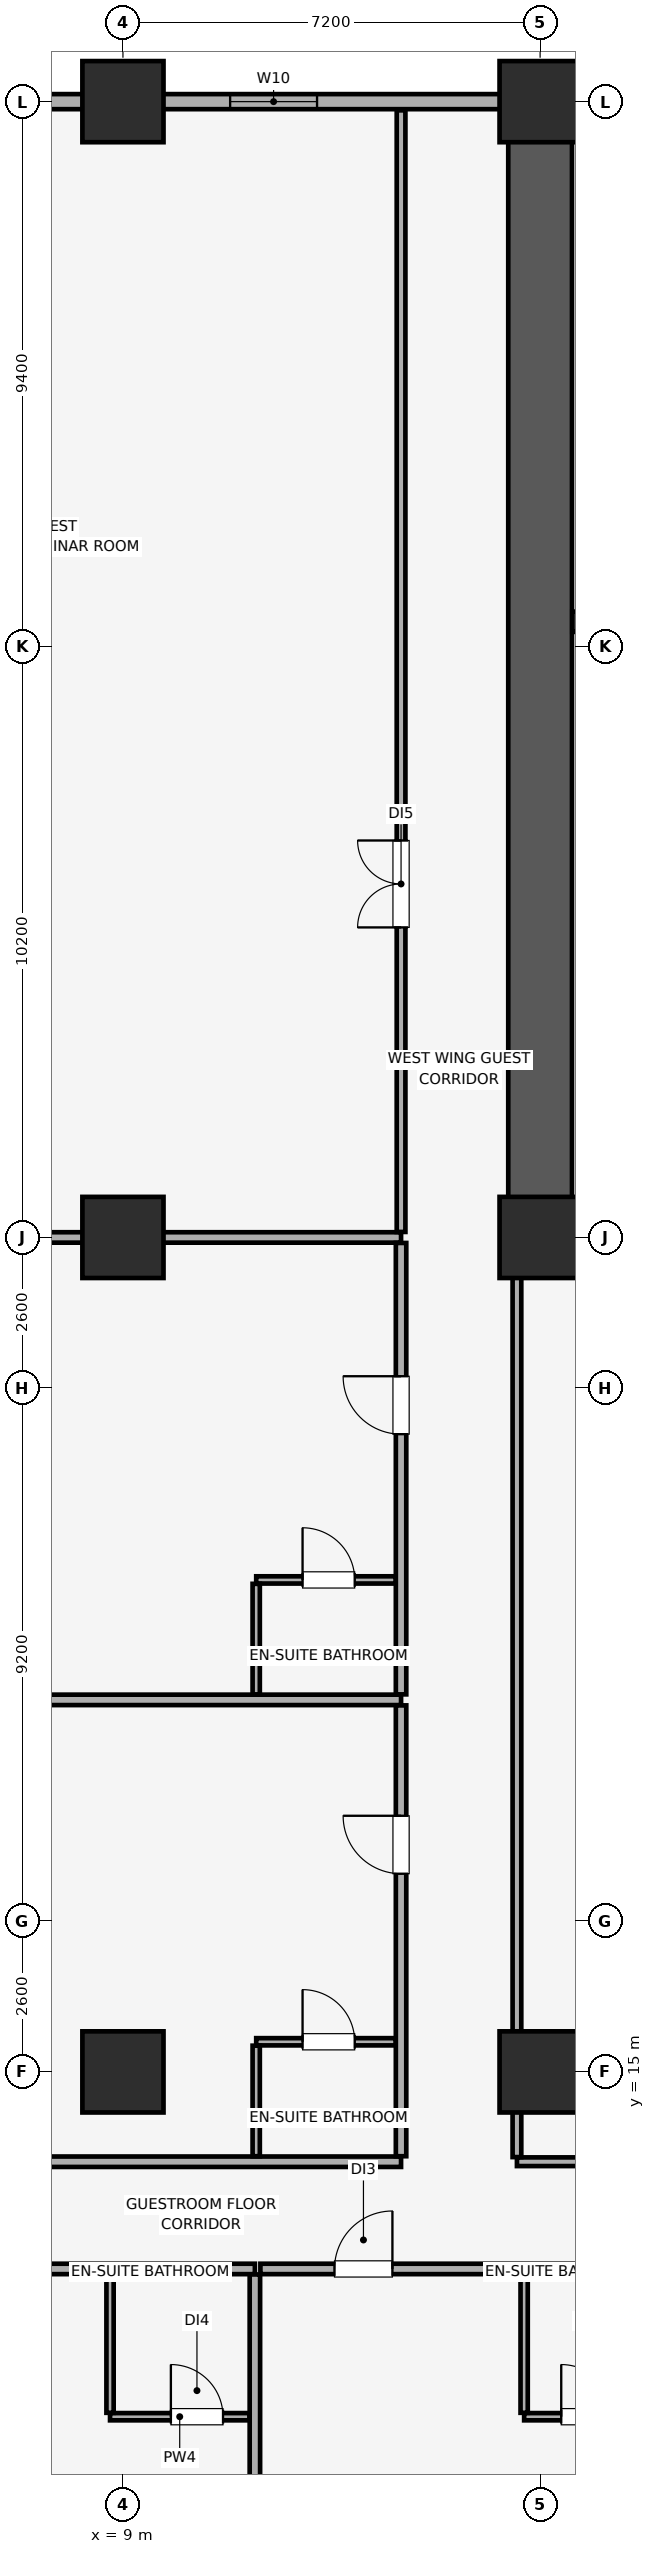
"""IFC4 building model, lengths in metres.
Left out: names, types, materials, properties, quantities, classifications, styles, units other than length and angle.
Written with IfcOpenShell. Run it as: python <this file> out.ifc"""

import sys

from ifc_helpers import new_model, si_unit, direction, frame, frame_2d, origin, origin_2d, place, context, subcontext, project, spatial, rectangle, extrude, element, fill, save


model = new_model("IFC4")
c1 = context("Model", 3, precision=1e-05, world=origin(), true_north=direction((0.0, 1.0)))
c2 = subcontext(c1, "Body", "Model", "MODEL_VIEW")
j1 = project(units=[si_unit("LENGTHUNIT", "METRE"), si_unit("PLANEANGLEUNIT", "RADIAN")], contexts=[c1])
p1 = place(None, origin())
s1 = spatial("IfcSite", under=j1, at=p1, CompositionType="ELEMENT")
p2 = place(p1, origin())
s2 = spatial("IfcBuilding", under=s1, at=p2, CompositionType="ELEMENT")
p3 = place(p2, frame((0.0, 0.0, 57.65)))
s3 = spatial("IfcBuildingStorey", under=s2, at=p3, CompositionType="ELEMENT", Elevation=57.65)
for number, where, z_axis, x_axis in (
    (1, (9.0, 15.0, 0.0), (0.0, 0.0, 1.0), (1.0, 0.0, 0.0)),
    (2, (16.2, 15.0, 0.0), (0.0, 0.0, 1.0), (1.0, 0.0, 0.0)),
    (3, (9.0, 29.4, 0.0), (0.0, 0.0, 1.0), (1.0, 0.0, 0.0)),
    (4, (9.0, 49.0, 0.0), (0.0, 0.0, 1.0), (1.0, 0.0, 0.0)),
    (5, (16.2, 29.4, 0.0), (0.0, 0.0, 1.0), (1.0, 0.0, 0.0)),
    (6, (16.2, 49.0, 0.0), (0.0, 0.0, 1.0), (1.0, 0.0, 0.0)),
):
    element("IfcColumn", number, at=place(p3, frame(where, z_axis=z_axis, x_axis=x_axis)), inside=s3, PredefinedType="COLUMN", context=c2, shape_type="SweptSolid", body=[
        extrude(rectangle(XDim=1.4, YDim=1.4, at=origin_2d()), origin(), (0.0, 0.0, 1.0), 3.51),
    ])
p4 = place(p3, frame((79.8, 49.0, 0.0), z_axis=(0.0, 0.0, 1.0), x_axis=(-1.0, 0.0, 0.0)))
e7 = element("IfcWall", 7, at=p4, inside=s3, PredefinedType="SOLIDWALL", context=c2, shape_type="SweptSolid", body=[
    extrude(rectangle(XDim=75.6, YDim=0.26, at=frame_2d((37.8, 0.0))), origin(), (0.0, 0.0, 1.0), 2.56),
])
p5 = place(p4, frame((72.565, 0.0, 0.85)))
e8 = element("IfcOpeningElement", 8, at=p5, cuts=e7, PredefinedType="OPENING", context=c2, shape_type="SweptSolid", body=[
    extrude(rectangle(XDim=1.5, YDim=1.4, at=frame_2d((0.75, 0.7))), frame((0.0, 0.14, 0.0), z_axis=(0.0, -1.0, 0.0), x_axis=(1.0, 0.0, 0.0)), (0.0, 0.0, 1.0), 0.28),
])
p6 = place(p4, frame((67.45, 0.0, 0.85)))
e9 = element("IfcOpeningElement", 9, at=p6, cuts=e7, PredefinedType="OPENING", context=c2, shape_type="SweptSolid", body=[
    extrude(rectangle(XDim=1.5, YDim=1.4, at=frame_2d((0.75, 0.7))), frame((0.0, 0.14, 0.0), z_axis=(0.0, -1.0, 0.0), x_axis=(1.0, 0.0, 0.0)), (0.0, 0.0, 1.0), 0.28),
])
p7 = place(p4, frame((7.6, 0.0, 0.85)))
e10 = element("IfcOpeningElement", 10, at=p7, cuts=e7, PredefinedType="OPENING", context=c2, shape_type="SweptSolid", body=[
    extrude(rectangle(XDim=1.5, YDim=1.4, at=frame_2d((0.75, 0.7))), frame((0.0, 0.14, 0.0), z_axis=(0.0, -1.0, 0.0), x_axis=(1.0, 0.0, 0.0)), (0.0, 0.0, 1.0), 0.28),
])
p8 = place(p4, frame((1.535, 0.0, 0.85)))
e11 = element("IfcOpeningElement", 11, at=p8, cuts=e7, PredefinedType="OPENING", context=c2, shape_type="SweptSolid", body=[
    extrude(rectangle(XDim=1.5, YDim=1.4, at=frame_2d((0.75, 0.7))), frame((0.0, 0.14, 0.0), z_axis=(0.0, -1.0, 0.0), x_axis=(1.0, 0.0, 0.0)), (0.0, 0.0, 1.0), 0.28),
])
p9 = place(p4, frame((52.265, 0.0, 0.9)))
e12 = element("IfcOpeningElement", 12, at=p9, cuts=e7, PredefinedType="OPENING", context=c2, shape_type="SweptSolid", body=[
    extrude(rectangle(XDim=1.5, YDim=1.4, at=frame_2d((0.75, 0.7))), frame((0.0, 0.14, 0.0), z_axis=(0.0, -1.0, 0.0), x_axis=(1.0, 0.0, 0.0)), (0.0, 0.0, 1.0), 0.28),
])
p10 = place(p4, frame((45.5, 0.0, 0.9)))
e13 = element("IfcOpeningElement", 13, at=p10, cuts=e7, PredefinedType="OPENING", context=c2, shape_type="SweptSolid", body=[
    extrude(rectangle(XDim=1.5, YDim=1.4, at=frame_2d((0.75, 0.7))), frame((0.0, 0.14, 0.0), z_axis=(0.0, -1.0, 0.0), x_axis=(1.0, 0.0, 0.0)), (0.0, 0.0, 1.0), 0.28),
])
p11 = place(p4, frame((31.05, 0.0, 0.9)))
e14 = element("IfcOpeningElement", 14, at=p11, cuts=e7, PredefinedType="OPENING", context=c2, shape_type="SweptSolid", body=[
    extrude(rectangle(XDim=1.5, YDim=1.4, at=frame_2d((0.75, 0.7))), frame((0.0, 0.14, 0.0), z_axis=(0.0, -1.0, 0.0), x_axis=(1.0, 0.0, 0.0)), (0.0, 0.0, 1.0), 0.28),
])
p12 = place(p4, frame((27.85, 0.0, 0.9)))
e15 = element("IfcOpeningElement", 15, at=p12, cuts=e7, PredefinedType="OPENING", context=c2, shape_type="SweptSolid", body=[
    extrude(rectangle(XDim=1.5, YDim=1.4, at=frame_2d((0.75, 0.7))), frame((0.0, 0.14, 0.0), z_axis=(0.0, -1.0, 0.0), x_axis=(1.0, 0.0, 0.0)), (0.0, 0.0, 1.0), 0.28),
])
p13 = place(p4, frame((23.485, 0.0, 0.9)))
e16 = element("IfcOpeningElement", 16, at=p13, cuts=e7, PredefinedType="OPENING", context=c2, shape_type="SweptSolid", body=[
    extrude(rectangle(XDim=1.5, YDim=1.4, at=frame_2d((0.75, 0.7))), frame((0.0, 0.14, 0.0), z_axis=(0.0, -1.0, 0.0), x_axis=(1.0, 0.0, 0.0)), (0.0, 0.0, 1.0), 0.28),
])
p14 = place(p3, frame((16.2, 29.4, 0.0), z_axis=(0.0, 0.0, 1.0), x_axis=(0.0, 1.0, 0.0)))
e17 = element("IfcWall", 17, at=p14, inside=s3, PredefinedType="SHEAR", context=c2, shape_type="SweptSolid", body=[
    extrude(rectangle(XDim=19.2, YDim=1.1, at=frame_2d((9.6, 0.0))), origin(), (0.0, 0.0, 1.0), 3.51),
])
p15 = place(p3, frame((16.755, 29.4, 0.0), z_axis=(0.0, 0.0, 1.0), x_axis=(1.0, 0.0, 0.0)))
e18 = element("IfcWall", 18, at=p15, inside=s3, PredefinedType="SHEAR", context=c2, shape_type="SweptSolid", body=[
    extrude(rectangle(XDim=6.845, YDim=1.1, at=frame_2d((3.423, 0.0))), origin(), (0.0, 0.0, 1.0), 3.51),
])
p16 = place(p3, frame((16.755, 40.025, 0.0), z_axis=(0.0, 0.0, 1.0), x_axis=(1.0, 0.0, 0.0)))
e19 = element("IfcWall", 19, at=p16, inside=s3, PredefinedType="SHEAR", context=c2, shape_type="SweptSolid", body=[
    extrude(rectangle(XDim=4.1, YDim=0.35, at=frame_2d((2.05, 0.0))), origin(), (0.0, 0.0, 1.0), 3.51),
])
p17 = place(p16, frame((1.71, 0.0, 0.0)))
e20 = element("IfcOpeningElement", 20, at=p17, cuts=e19, PredefinedType="OPENING", context=c2, shape_type="SweptSolid", body=[
    extrude(rectangle(XDim=1.15, YDim=2.15, at=frame_2d((0.575, 1.075))), frame((0.0, 0.185, 0.0), z_axis=(0.0, -1.0, 0.0), x_axis=(1.0, 0.0, 0.0)), (0.0, 0.0, 1.0), 0.37),
])
p18 = place(p3, frame((0.15, 11.6, 0.0), z_axis=(0.0, 0.0, 1.0), x_axis=(1.0, 0.0, 0.0)))
e21 = element("IfcWall", 21, at=p18, inside=s3, PredefinedType="PARTITIONING", context=c2, shape_type="SweptSolid", body=[
    extrude(rectangle(XDim=11.127, YDim=0.18, at=frame_2d((5.564, 0.0))), origin(), (0.0, 0.0, 1.0), 3.51),
])
p19 = place(p18, frame((5.514, 0.0, 0.0)))
e22 = element("IfcOpeningElement", 22, at=p19, cuts=e21, PredefinedType="OPENING", context=c2, shape_type="SweptSolid", body=[
    extrude(rectangle(XDim=1.0, YDim=2.15, at=frame_2d((0.5, 1.075))), frame((0.0, 0.1, 0.0), z_axis=(0.0, -1.0, 0.0), x_axis=(1.0, 0.0, 0.0)), (0.0, 0.0, 1.0), 0.2),
])
p20 = place(p3, frame((11.277, 0.15, 0.0), z_axis=(0.0, 0.0, 1.0), x_axis=(0.0, 1.0, 0.0)))
e23 = element("IfcWall", 23, at=p20, inside=s3, PredefinedType="PARTITIONING", context=c2, shape_type="SweptSolid", body=[
    extrude(rectangle(XDim=11.355, YDim=0.18, at=frame_2d((5.677, 0.0))), origin(), (0.0, 0.0, 1.0), 3.51),
])
p21 = place(p3, frame((8.777, 9.05, 0.0), z_axis=(0.0, 0.0, 1.0), x_axis=(1.0, 0.0, 0.0)))
e24 = element("IfcWall", 24, at=p21, inside=s3, PredefinedType="PARTITIONING", context=c2, shape_type="SweptSolid", body=[
    extrude(rectangle(XDim=2.405, YDim=0.125, at=frame_2d((1.203, 0.0))), origin(), (0.0, 0.0, 1.0), 3.51),
])
p22 = place(p21, frame((1.05, 0.0, 0.0)))
e25 = element("IfcOpeningElement", 25, at=p22, cuts=e24, PredefinedType="OPENING", context=c2, shape_type="SweptSolid", body=[
    extrude(rectangle(XDim=0.9, YDim=2.1, at=frame_2d((0.45, 1.05))), frame((0.0, 0.073, 0.0), z_axis=(0.0, -1.0, 0.0), x_axis=(1.0, 0.0, 0.0)), (0.0, 0.0, 1.0), 0.145),
])
p23 = place(p3, frame((8.777, 9.117, 0.0), z_axis=(0.0, 0.0, 1.0), x_axis=(0.0, 1.0, 0.0)))
e26 = element("IfcWall", 26, at=p23, inside=s3, PredefinedType="PARTITIONING", context=c2, shape_type="SweptSolid", body=[
    extrude(rectangle(XDim=2.387, YDim=0.125, at=frame_2d((1.194, 0.0))), origin(), (0.0, 0.0, 1.0), 2.898),
])
p24 = place(p3, frame((11.372, 11.6, 0.0), z_axis=(0.0, 0.0, 1.0), x_axis=(1.0, 0.0, 0.0)))
e27 = element("IfcWall", 27, at=p24, inside=s3, PredefinedType="PARTITIONING", context=c2, shape_type="SweptSolid", body=[
    extrude(rectangle(XDim=6.732, YDim=0.18, at=frame_2d((3.366, 0.0))), origin(), (0.0, 0.0, 1.0), 3.51),
])
p25 = place(p24, frame((1.279, 0.0, 0.0)))
e28 = element("IfcOpeningElement", 28, at=p25, cuts=e27, PredefinedType="OPENING", context=c2, shape_type="SweptSolid", body=[
    extrude(rectangle(XDim=1.0, YDim=2.15, at=frame_2d((0.5, 1.075))), frame((0.0, 0.1, 0.0), z_axis=(0.0, -1.0, 0.0), x_axis=(1.0, 0.0, 0.0)), (0.0, 0.0, 1.0), 0.2),
])
p26 = place(p3, frame((15.925, 9.05, 0.0), z_axis=(0.0, 0.0, 1.0), x_axis=(1.0, 0.0, 0.0)))
e29 = element("IfcWall", 29, at=p26, inside=s3, PredefinedType="PARTITIONING", context=c2, shape_type="SweptSolid", body=[
    extrude(rectangle(XDim=2.085, YDim=0.125, at=frame_2d((1.042, 0.0))), origin(), (0.0, 0.0, 1.0), 3.51),
])
p27 = place(p26, frame((0.64, 0.0, 0.0)))
e30 = element("IfcOpeningElement", 30, at=p27, cuts=e29, PredefinedType="OPENING", context=c2, shape_type="SweptSolid", body=[
    extrude(rectangle(XDim=0.9, YDim=2.1, at=frame_2d((0.45, 1.05))), frame((0.0, 0.073, 0.0), z_axis=(0.0, -1.0, 0.0), x_axis=(1.0, 0.0, 0.0)), (0.0, 0.0, 1.0), 0.145),
])
p28 = place(p3, frame((15.925, 9.117, 0.0), z_axis=(0.0, 0.0, 1.0), x_axis=(0.0, 1.0, 0.0)))
e31 = element("IfcWall", 31, at=p28, inside=s3, PredefinedType="PARTITIONING", context=c2, shape_type="SweptSolid", body=[
    extrude(rectangle(XDim=2.387, YDim=0.125, at=frame_2d((1.194, 0.0))), origin(), (0.0, 0.0, 1.0), 3.51),
])
p29 = place(p3, frame((15.8, 13.45, 0.0), z_axis=(0.0, 0.0, 1.0), x_axis=(1.0, 0.0, 0.0)))
e32 = element("IfcWall", 32, at=p29, inside=s3, PredefinedType="PARTITIONING", context=c2, shape_type="SweptSolid", body=[
    extrude(rectangle(XDim=13.2, YDim=0.15, at=frame_2d((6.6, 0.0))), origin(), (0.0, 0.0, 1.0), 3.51),
])
p30 = place(p29, frame((5.35, 0.0, 0.0)))
e33 = element("IfcOpeningElement", 33, at=p30, cuts=e32, PredefinedType="OPENING", context=c2, shape_type="SweptSolid", body=[
    extrude(rectangle(XDim=1.5, YDim=2.25, at=frame_2d((0.75, 1.125))), frame((0.0, 0.085, 0.0), z_axis=(0.0, -1.0, 0.0), x_axis=(1.0, 0.0, 0.0)), (0.0, 0.0, 1.0), 0.17),
])
p31 = place(p3, frame((15.8, 13.53, 0.0), z_axis=(0.0, 0.0, 1.0), x_axis=(0.0, 1.0, 0.0)))
e34 = element("IfcWall", 34, at=p31, inside=s3, PredefinedType="PARTITIONING", context=c2, shape_type="SweptSolid", body=[
    extrude(rectangle(XDim=15.86, YDim=0.15, at=frame_2d((7.93, 0.0))), origin(), (0.0, 0.0, 1.0), 3.51),
])
for number, where, z_axis, x_axis in (
    (35, (0.15, 13.45, 0.0), (0.0, 0.0, 1.0), (1.0, 0.0, 0.0)),
    (36, (0.15, 21.42, 0.0), (0.0, 0.0, 1.0), (1.0, 0.0, 0.0)),
):
    element("IfcWall", number, at=place(p3, frame(where, z_axis=z_axis, x_axis=x_axis)), inside=s3, PredefinedType="PARTITIONING", context=c2, shape_type="SweptSolid", body=[
        extrude(rectangle(XDim=13.65, YDim=0.18, at=frame_2d((6.825, 0.0))), origin(), (0.0, 0.0, 1.0), 3.51),
    ])
p32 = place(p3, frame((13.8, 13.545, 0.0), z_axis=(0.0, 0.0, 1.0), x_axis=(0.0, 1.0, 0.0)))
e37 = element("IfcWall", 37, at=p32, inside=s3, PredefinedType="PARTITIONING", context=c2, shape_type="SweptSolid", body=[
    extrude(rectangle(XDim=7.78, YDim=0.18, at=frame_2d((3.89, 0.0))), origin(), (0.0, 0.0, 1.0), 3.51),
])
p33 = place(p32, frame((4.875, 0.0, 0.0)))
e38 = element("IfcOpeningElement", 38, at=p33, cuts=e37, PredefinedType="OPENING", context=c2, shape_type="SweptSolid", body=[
    extrude(rectangle(XDim=1.0, YDim=2.15, at=frame_2d((0.5, 1.075))), frame((0.0, 0.1, 0.0), z_axis=(0.0, -1.0, 0.0), x_axis=(1.0, 0.0, 0.0)), (0.0, 0.0, 1.0), 0.2),
])
p34 = place(p3, frame((11.3, 15.52, 0.0), z_axis=(0.0, 0.0, 1.0), x_axis=(1.0, 0.0, 0.0)))
e39 = element("IfcWall", 39, at=p34, inside=s3, PredefinedType="PARTITIONING", context=c2, shape_type="SweptSolid", body=[
    extrude(rectangle(XDim=2.405, YDim=0.125, at=frame_2d((1.203, 0.0))), origin(), (0.0, 0.0, 1.0), 3.51),
])
p35 = place(p34, frame((0.8, 0.0, 0.0)))
e40 = element("IfcOpeningElement", 40, at=p35, cuts=e39, PredefinedType="OPENING", context=c2, shape_type="SweptSolid", body=[
    extrude(rectangle(XDim=0.9, YDim=2.1, at=frame_2d((0.45, 1.05))), frame((0.0, 0.073, 0.0), z_axis=(0.0, -1.0, 0.0), x_axis=(1.0, 0.0, 0.0)), (0.0, 0.0, 1.0), 0.145),
])
p36 = place(p3, frame((11.3, 13.545, 0.0), z_axis=(0.0, 0.0, 1.0), x_axis=(0.0, 1.0, 0.0)))
e41 = element("IfcWall", 41, at=p36, inside=s3, PredefinedType="PARTITIONING", context=c2, shape_type="SweptSolid", body=[
    extrude(rectangle(XDim=1.907, YDim=0.125, at=frame_2d((0.954, 0.0))), origin(), (0.0, 0.0, 1.0), 3.51),
])
p37 = place(p3, frame((0.15, 29.4, 0.0), z_axis=(0.0, 0.0, 1.0), x_axis=(1.0, 0.0, 0.0)))
e42 = element("IfcWall", 42, at=p37, inside=s3, PredefinedType="PARTITIONING", context=c2, shape_type="SweptSolid", body=[
    extrude(rectangle(XDim=13.65, YDim=0.18, at=frame_2d((6.825, 0.0))), origin(), (0.0, 0.0, 1.0), 2.86),
])
p38 = place(p3, frame((13.8, 21.515, 0.0), z_axis=(0.0, 0.0, 1.0), x_axis=(0.0, 1.0, 0.0)))
e43 = element("IfcWall", 43, at=p38, inside=s3, PredefinedType="PARTITIONING", context=c2, shape_type="SweptSolid", body=[
    extrude(rectangle(XDim=7.79, YDim=0.18, at=frame_2d((3.895, 0.0))), origin(), (0.0, 0.0, 1.0), 3.51),
])
p39 = place(p38, frame((4.49, 0.0, 0.0)))
e44 = element("IfcOpeningElement", 44, at=p39, cuts=e43, PredefinedType="OPENING", context=c2, shape_type="SweptSolid", body=[
    extrude(rectangle(XDim=1.0, YDim=2.15, at=frame_2d((0.5, 1.075))), frame((0.0, 0.1, 0.0), z_axis=(0.0, -1.0, 0.0), x_axis=(1.0, 0.0, 0.0)), (0.0, 0.0, 1.0), 0.2),
])
p40 = place(p3, frame((11.3, 23.49, 0.0), z_axis=(0.0, 0.0, 1.0), x_axis=(1.0, 0.0, 0.0)))
e45 = element("IfcWall", 45, at=p40, inside=s3, PredefinedType="PARTITIONING", context=c2, shape_type="SweptSolid", body=[
    extrude(rectangle(XDim=2.405, YDim=0.125, at=frame_2d((1.203, 0.0))), origin(), (0.0, 0.0, 1.0), 3.51),
])
p41 = place(p40, frame((0.8, 0.0, 0.0)))
e46 = element("IfcOpeningElement", 46, at=p41, cuts=e45, PredefinedType="OPENING", context=c2, shape_type="SweptSolid", body=[
    extrude(rectangle(XDim=0.9, YDim=2.1, at=frame_2d((0.45, 1.05))), frame((0.0, 0.073, 0.0), z_axis=(0.0, -1.0, 0.0), x_axis=(1.0, 0.0, 0.0)), (0.0, 0.0, 1.0), 0.145),
])
p42 = place(p3, frame((11.3, 21.515, 0.0), z_axis=(0.0, 0.0, 1.0), x_axis=(0.0, 1.0, 0.0)))
e47 = element("IfcWall", 47, at=p42, inside=s3, PredefinedType="PARTITIONING", context=c2, shape_type="SweptSolid", body=[
    extrude(rectangle(XDim=1.908, YDim=0.125, at=frame_2d((0.954, 0.0))), origin(), (0.0, 0.0, 1.0), 3.51),
])
p43 = place(p3, frame((13.8, 29.495, 0.0), z_axis=(0.0, 0.0, 1.0), x_axis=(0.0, 1.0, 0.0)))
e48 = element("IfcWall", 48, at=p43, inside=s3, PredefinedType="PARTITIONING", context=c2, shape_type="SweptSolid", body=[
    extrude(rectangle(XDim=19.355, YDim=0.15, at=frame_2d((9.677, 0.0))), origin(), (0.0, 0.0, 1.0), 3.51),
])
p44 = place(p43, frame((5.255, 0.0, 0.0)))
e49 = element("IfcOpeningElement", 49, at=p44, cuts=e48, PredefinedType="OPENING", context=c2, shape_type="SweptSolid", body=[
    extrude(rectangle(XDim=1.5, YDim=2.25, at=frame_2d((0.75, 1.125))), frame((0.0, 0.085, 0.0), z_axis=(0.0, -1.0, 0.0), x_axis=(1.0, 0.0, 0.0)), (0.0, 0.0, 1.0), 0.17),
])
p45 = place(p6, origin())
e50 = element("IfcWindow", 50, at=p45, inside=s3, PartitioningType="SINGLE_PANEL", PredefinedType="WINDOW", context=c2, shape_type="SweptSolid", body=[
    extrude(rectangle(XDim=1.5, YDim=1.4, at=frame_2d((0.75, 0.7))), frame((0.0, 0.03, 0.0), z_axis=(0.0, -1.0, 0.0), x_axis=(1.0, 0.0, 0.0)), (0.0, 0.0, 1.0), 0.06),
])
fill(e9, e50)
p46 = place(p22, origin())
e51 = element("IfcDoor", 51, at=p46, inside=s3, OperationType="SINGLE_SWING_LEFT", PredefinedType="DOOR", context=c2, shape_type="SweptSolid", body=[
    extrude(rectangle(XDim=0.9, YDim=2.1, at=frame_2d((0.45, 1.05))), frame((0.0, 0.025, 0.0), z_axis=(0.0, -1.0, 0.0), x_axis=(1.0, 0.0, 0.0)), (0.0, 0.0, 1.0), 0.05),
])
fill(e25, e51)
p47 = place(p25, origin())
e52 = element("IfcDoor", 52, at=p47, inside=s3, OperationType="SINGLE_SWING_RIGHT", PredefinedType="DOOR", context=c2, shape_type="SweptSolid", body=[
    extrude(rectangle(XDim=1.0, YDim=2.15, at=frame_2d((0.5, 1.075))), frame((0.0, 0.025, 0.0), z_axis=(0.0, -1.0, 0.0), x_axis=(1.0, 0.0, 0.0)), (0.0, 0.0, 1.0), 0.05),
])
fill(e28, e52)
p48 = place(p27, origin())
e53 = element("IfcDoor", 53, at=p48, inside=s3, OperationType="SINGLE_SWING_LEFT", PredefinedType="DOOR", context=c2, shape_type="SweptSolid", body=[
    extrude(rectangle(XDim=0.9, YDim=2.1, at=frame_2d((0.45, 1.05))), frame((0.0, 0.025, 0.0), z_axis=(0.0, -1.0, 0.0), x_axis=(1.0, 0.0, 0.0)), (0.0, 0.0, 1.0), 0.05),
])
fill(e30, e53)
p49 = place(p33, origin())
e54 = element("IfcDoor", 54, at=p49, inside=s3, OperationType="SINGLE_SWING_RIGHT", PredefinedType="DOOR", context=c2, shape_type="SweptSolid", body=[
    extrude(rectangle(XDim=1.0, YDim=2.15, at=frame_2d((0.5, 1.075))), frame((0.0, 0.025, 0.0), z_axis=(0.0, -1.0, 0.0), x_axis=(1.0, 0.0, 0.0)), (0.0, 0.0, 1.0), 0.05),
])
fill(e38, e54)
p50 = place(p35, origin())
e55 = element("IfcDoor", 55, at=p50, inside=s3, OperationType="SINGLE_SWING_LEFT", PredefinedType="DOOR", context=c2, shape_type="SweptSolid", body=[
    extrude(rectangle(XDim=0.9, YDim=2.1, at=frame_2d((0.45, 1.05))), frame((0.0, 0.025, 0.0), z_axis=(0.0, -1.0, 0.0), x_axis=(1.0, 0.0, 0.0)), (0.0, 0.0, 1.0), 0.05),
])
fill(e40, e55)
p51 = place(p39, origin())
e56 = element("IfcDoor", 56, at=p51, inside=s3, OperationType="SINGLE_SWING_RIGHT", PredefinedType="DOOR", context=c2, shape_type="SweptSolid", body=[
    extrude(rectangle(XDim=1.0, YDim=2.15, at=frame_2d((0.5, 1.075))), frame((0.0, 0.025, 0.0), z_axis=(0.0, -1.0, 0.0), x_axis=(1.0, 0.0, 0.0)), (0.0, 0.0, 1.0), 0.05),
])
fill(e44, e56)
p52 = place(p41, origin())
e57 = element("IfcDoor", 57, at=p52, inside=s3, OperationType="SINGLE_SWING_LEFT", PredefinedType="DOOR", context=c2, shape_type="SweptSolid", body=[
    extrude(rectangle(XDim=0.9, YDim=2.1, at=frame_2d((0.45, 1.05))), frame((0.0, 0.025, 0.0), z_axis=(0.0, -1.0, 0.0), x_axis=(1.0, 0.0, 0.0)), (0.0, 0.0, 1.0), 0.05),
])
fill(e46, e57)
p53 = place(p44, origin())
e58 = element("IfcDoor", 58, at=p53, inside=s3, OperationType="DOUBLE_DOOR_SINGLE_SWING", PredefinedType="DOOR", context=c2, shape_type="SweptSolid", body=[
    extrude(rectangle(XDim=1.5, YDim=2.25, at=frame_2d((0.75, 1.125))), frame((0.0, 0.025, 0.0), z_axis=(0.0, -1.0, 0.0), x_axis=(1.0, 0.0, 0.0)), (0.0, 0.0, 1.0), 0.05),
])
fill(e49, e58)
save(model, sys.argv[1])
